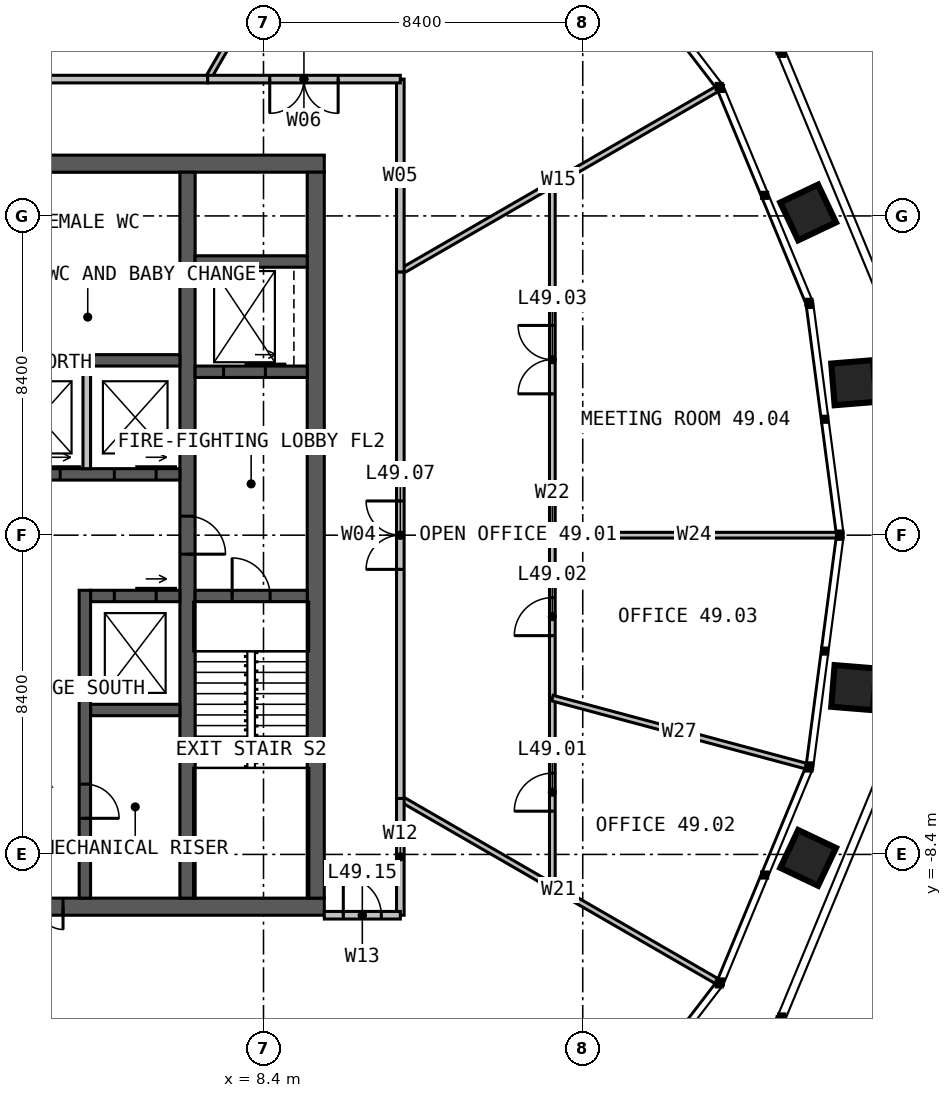
"""IFC4 building model, lengths in metres.
Left out: names, types, materials, properties, quantities, classifications, styles, units other than length and angle.
Written with IfcOpenShell. Run it as: python <this file> out.ifc"""

import sys

from ifc_helpers import new_model, si_unit, direction, frame, frame_2d, origin, place, context, subcontext, project, spatial, rectangle, extrude, element, fill, save


model = new_model("IFC4")
c1 = context("Model", 3, precision=1e-05, world=origin(), true_north=direction((0.0, 1.0)))
c2 = subcontext(c1, "Body", "Model", "MODEL_VIEW")
j1 = project(units=[si_unit("LENGTHUNIT", "METRE"), si_unit("PLANEANGLEUNIT", "RADIAN")], contexts=[c1])
p1 = place(None, origin())
s1 = spatial("IfcSite", under=j1, at=p1, CompositionType="ELEMENT")
p2 = place(p1, origin())
s2 = spatial("IfcBuilding", under=s1, at=p2, CompositionType="ELEMENT")
p3 = place(p2, frame((0.0, 0.0, 203.0)))
s3 = spatial("IfcBuildingStorey", under=s2, at=p3, CompositionType="ELEMENT", Elevation=203.0)
p4 = place(p3, frame((-10.0, 9.775, 0.0), z_axis=(0.0, 0.0, 1.0), x_axis=(1.0, 0.0, 0.0)))
e1 = element("IfcWall", 1, at=p4, inside=s3, PredefinedType="SOLIDWALL", context=c2, shape_type="SweptSolid", body=[
    extrude(rectangle(XDim=20.0, YDim=0.45, at=frame_2d((10.0, 0.0))), origin(), (0.0, 0.0, 1.0), 4.0),
])
p5 = place(p4, frame((9.4, 0.0, 0.0)))
e2 = element("IfcOpeningElement", 2, at=p5, cuts=e1, PredefinedType="OPENING", context=c2, shape_type="SweptSolid", body=[
    extrude(rectangle(XDim=1.2, YDim=2.2, at=frame_2d((0.6, 1.1))), frame((0.0, 0.235, 0.0), z_axis=(0.0, -1.0, 0.0), x_axis=(1.0, 0.0, 0.0)), (0.0, 0.0, 1.0), 0.47),
])
p6 = place(p3, frame((10.0, -9.775, 0.0), z_axis=(0.0, 0.0, 1.0), x_axis=(-1.0, 0.0, 0.0)))
e3 = element("IfcWall", 3, at=p6, inside=s3, PredefinedType="SOLIDWALL", context=c2, shape_type="SweptSolid", body=[
    extrude(rectangle(XDim=20.0, YDim=0.45, at=frame_2d((10.0, 0.0))), origin(), (0.0, 0.0, 1.0), 4.0),
])
p7 = place(p6, frame((6.875, 0.0, 0.0)))
e4 = element("IfcOpeningElement", 4, at=p7, cuts=e3, PredefinedType="OPENING", context=c2, shape_type="SweptSolid", body=[
    extrude(rectangle(XDim=1.2, YDim=2.2, at=frame_2d((0.6, 1.1))), frame((0.0, 0.235, 0.0), z_axis=(0.0, -1.0, 0.0), x_axis=(1.0, 0.0, 0.0)), (0.0, 0.0, 1.0), 0.47),
])
p8 = place(p3, frame((9.775, -9.55, 0.0), z_axis=(0.0, 0.0, 1.0), x_axis=(0.0, 1.0, 0.0)))
e5 = element("IfcWall", 5, at=p8, inside=s3, PredefinedType="SOLIDWALL", context=c2, shape_type="SweptSolid", body=[
    extrude(rectangle(XDim=19.1, YDim=0.45, at=frame_2d((9.55, 0.0))), origin(), (0.0, 0.0, 1.0), 4.0),
])
p9 = place(p3, frame((6.4, 9.55, 0.0), z_axis=(0.0, 0.0, 1.0), x_axis=(0.0, -1.0, 0.0)))
e6 = element("IfcWall", 6, at=p9, inside=s3, PredefinedType="SOLIDWALL", context=c2, shape_type="SweptSolid", body=[
    extrude(rectangle(XDim=19.1, YDim=0.4, at=frame_2d((9.55, 0.0))), origin(), (0.0, 0.0, 1.0), 4.0),
])
p10 = place(p9, frame((9.05, 0.0, 0.0)))
e7 = element("IfcOpeningElement", 7, at=p10, cuts=e6, PredefinedType="OPENING", context=c2, shape_type="SweptSolid", body=[
    extrude(rectangle(XDim=1.0, YDim=2.2, at=frame_2d((0.5, 1.1))), frame((0.0, 0.21, 0.0), z_axis=(0.0, -1.0, 0.0), x_axis=(1.0, 0.0, 0.0)), (0.0, 0.0, 1.0), 0.42),
])
p11 = place(p3, frame((1.35, 1.6, 0.0), z_axis=(0.0, 0.0, 1.0), x_axis=(1.0, 0.0, 0.0)))
e8 = element("IfcWall", 8, at=p11, inside=s3, PredefinedType="SOLIDWALL", context=c2, shape_type="SweptSolid", body=[
    extrude(rectangle(XDim=4.85, YDim=0.3, at=frame_2d((2.425, 0.0))), origin(), (0.0, 0.0, 1.0), 4.0),
])
p12 = place(p11, frame((0.6, 0.0, 0.0)))
e9 = element("IfcOpeningElement", 9, at=p12, cuts=e8, PredefinedType="OPENING", context=c2, shape_type="SweptSolid", body=[
    extrude(rectangle(XDim=1.1, YDim=2.2, at=frame_2d((0.55, 1.1))), frame((0.0, 0.16, 0.0), z_axis=(0.0, -1.0, 0.0), x_axis=(1.0, 0.0, 0.0)), (0.0, 0.0, 1.0), 0.32),
])
p13 = place(p11, frame((3.125, 0.0, 0.0)))
e10 = element("IfcOpeningElement", 10, at=p13, cuts=e8, PredefinedType="OPENING", context=c2, shape_type="SweptSolid", body=[
    extrude(rectangle(XDim=1.1, YDim=2.2, at=frame_2d((0.55, 1.1))), frame((0.0, 0.16, 0.0), z_axis=(0.0, -1.0, 0.0), x_axis=(1.0, 0.0, 0.0)), (0.0, 0.0, 1.0), 0.32),
])
p14 = place(p3, frame((1.35, 4.6, 0.0), z_axis=(0.0, 0.0, 1.0), x_axis=(1.0, 0.0, 0.0)))
e11 = element("IfcWall", 11, at=p14, inside=s3, PredefinedType="SOLIDWALL", context=c2, shape_type="SweptSolid", body=[
    extrude(rectangle(XDim=4.85, YDim=0.3, at=frame_2d((2.425, 0.0))), origin(), (0.0, 0.0, 1.0), 4.0),
])
p15 = place(p3, frame((3.85, -1.6, 0.0), z_axis=(0.0, 0.0, 1.0), x_axis=(1.0, 0.0, 0.0)))
e12 = element("IfcWall", 12, at=p15, inside=s3, PredefinedType="SOLIDWALL", context=c2, shape_type="SweptSolid", body=[
    extrude(rectangle(XDim=2.35, YDim=0.3, at=frame_2d((1.175, 0.0))), origin(), (0.0, 0.0, 1.0), 4.0),
])
p16 = place(p15, frame((0.625, 0.0, 0.0)))
e13 = element("IfcOpeningElement", 13, at=p16, cuts=e12, PredefinedType="OPENING", context=c2, shape_type="SweptSolid", body=[
    extrude(rectangle(XDim=1.1, YDim=2.2, at=frame_2d((0.55, 1.1))), frame((0.0, 0.16, 0.0), z_axis=(0.0, -1.0, 0.0), x_axis=(1.0, 0.0, 0.0)), (0.0, 0.0, 1.0), 0.32),
])
p17 = place(p3, frame((3.85, -4.6, 0.0), z_axis=(0.0, 0.0, 1.0), x_axis=(1.0, 0.0, 0.0)))
e14 = element("IfcWall", 14, at=p17, inside=s3, PredefinedType="SOLIDWALL", context=c2, shape_type="SweptSolid", body=[
    extrude(rectangle(XDim=2.35, YDim=0.3, at=frame_2d((1.175, 0.0))), origin(), (0.0, 0.0, 1.0), 4.0),
])
p18 = place(p3, frame((3.7, -1.45, 0.0), z_axis=(0.0, 0.0, 1.0), x_axis=(0.0, -1.0, 0.0)))
e15 = element("IfcWall", 15, at=p18, inside=s3, PredefinedType="SOLIDWALL", context=c2, shape_type="SweptSolid", body=[
    extrude(rectangle(XDim=8.1, YDim=0.3, at=frame_2d((4.05, 0.0))), origin(), (0.0, 0.0, 1.0), 4.0),
])
p19 = place(p18, frame((5.1, 0.0, 0.0)))
e16 = element("IfcOpeningElement", 16, at=p19, cuts=e15, PredefinedType="OPENING", context=c2, shape_type="SweptSolid", body=[
    extrude(rectangle(XDim=0.9, YDim=2.2, at=frame_2d((0.45, 1.1))), frame((0.0, 0.16, 0.0), z_axis=(0.0, -1.0, 0.0), x_axis=(1.0, 0.0, 0.0)), (0.0, 0.0, 1.0), 0.32),
])
p20 = place(p3, frame((6.6, -1.6, 0.0), z_axis=(0.0, 0.0, 1.0), x_axis=(1.0, 0.0, 0.0)))
e17 = element("IfcWall", 17, at=p20, inside=s3, PredefinedType="SOLIDWALL", context=c2, shape_type="SweptSolid", body=[
    extrude(rectangle(XDim=2.95, YDim=0.3, at=frame_2d((1.475, 0.0))), origin(), (0.0, 0.0, 1.0), 4.0),
])
p21 = place(p20, frame((0.975, 0.0, 0.0)))
e18 = element("IfcOpeningElement", 18, at=p21, cuts=e17, PredefinedType="OPENING", context=c2, shape_type="SweptSolid", body=[
    extrude(rectangle(XDim=1.0, YDim=2.2, at=frame_2d((0.5, 1.1))), frame((0.0, 0.16, 0.0), z_axis=(0.0, -1.0, 0.0), x_axis=(1.0, 0.0, 0.0)), (0.0, 0.0, 1.0), 0.32),
])
p22 = place(p3, frame((6.6, 4.3, 0.0), z_axis=(0.0, 0.0, 1.0), x_axis=(1.0, 0.0, 0.0)))
e19 = element("IfcWall", 19, at=p22, inside=s3, PredefinedType="SOLIDWALL", context=c2, shape_type="SweptSolid", body=[
    extrude(rectangle(XDim=2.95, YDim=0.3, at=frame_2d((1.475, 0.0))), origin(), (0.0, 0.0, 1.0), 4.0),
])
p23 = place(p22, frame((0.75, 0.0, 0.0)))
e20 = element("IfcOpeningElement", 20, at=p23, cuts=e19, PredefinedType="OPENING", context=c2, shape_type="SweptSolid", body=[
    extrude(rectangle(XDim=1.1, YDim=2.2, at=frame_2d((0.55, 1.1))), frame((0.0, 0.16, 0.0), z_axis=(0.0, -1.0, 0.0), x_axis=(1.0, 0.0, 0.0)), (0.0, 0.0, 1.0), 0.32),
])
p24 = place(p3, frame((6.6, 7.2, 0.0), z_axis=(0.0, 0.0, 1.0), x_axis=(1.0, 0.0, 0.0)))
e21 = element("IfcWall", 21, at=p24, inside=s3, PredefinedType="SOLIDWALL", context=c2, shape_type="SweptSolid", body=[
    extrude(rectangle(XDim=2.95, YDim=0.3, at=frame_2d((1.475, 0.0))), origin(), (0.0, 0.0, 1.0), 4.0),
])
p25 = place(p3, frame((3.75, 1.75, 0.0), z_axis=(0.0, 0.0, 1.0), x_axis=(0.0, 1.0, 0.0)))
e22 = element("IfcWall", 22, at=p25, inside=s3, PredefinedType="SOLIDWALL", context=c2, shape_type="SweptSolid", body=[
    extrude(rectangle(XDim=2.7, YDim=0.2, at=frame_2d((1.35, 0.0))), origin(), (0.0, 0.0, 1.0), 3.75),
])
p26 = place(p3, frame((1.35, 6.8, 0.0), z_axis=(0.0, 0.0, 1.0), x_axis=(1.0, 0.0, 0.0)))
e23 = element("IfcWall", 23, at=p26, inside=s3, PredefinedType="PARTITIONING", context=c2, shape_type="SweptSolid", body=[
    extrude(rectangle(XDim=4.85, YDim=0.15, at=frame_2d((2.425, 0.0))), origin(), (0.0, 0.0, 1.0), 3.75),
])
for number, where, z_axis, x_axis in (
    (24, (12.0, -6.928, 0.0), (0.0, 0.0, 1.0), (0.866, -0.5, 0.0)),
    (25, (12.0, 6.928, 0.0), (0.0, 0.0, 1.0), (0.866, 0.5, 0.0)),
    (26, (6.928, 12.0, 0.0), (0.0, 0.0, 1.0), (0.5, 0.866, 0.0)),
):
    element("IfcWall", number, at=place(p3, frame(where, z_axis=z_axis, x_axis=x_axis)), inside=s3, PredefinedType="PARTITIONING", context=c2, shape_type="SweptSolid", body=[
        extrude(rectangle(XDim=9.62, YDim=0.15, at=frame_2d((4.81, 0.0))), origin(), (0.0, 0.0, 1.0), 2.79),
    ])
p27 = place(p3, frame((16.0, -9.238, 0.0), z_axis=(0.0, 0.0, 1.0), x_axis=(0.0, 1.0, 0.0)))
e27 = element("IfcWall", 27, at=p27, inside=s3, PredefinedType="PARTITIONING", context=c2, shape_type="SweptSolid", body=[
    extrude(rectangle(XDim=18.475, YDim=0.15, at=frame_2d((9.238, 0.0))), origin(), (0.0, 0.0, 1.0), 2.79),
])
p28 = place(p27, frame((1.975, 0.0, 0.0)))
e28 = element("IfcOpeningElement", 28, at=p28, cuts=e27, PredefinedType="OPENING", context=c2, shape_type="SweptSolid", body=[
    extrude(rectangle(XDim=1.0, YDim=2.2, at=frame_2d((0.5, 1.1))), frame((0.0, 0.085, 0.0), z_axis=(0.0, -1.0, 0.0), x_axis=(1.0, 0.0, 0.0)), (0.0, 0.0, 1.0), 0.17),
])
p29 = place(p27, frame((6.594, 0.0, 0.0)))
e29 = element("IfcOpeningElement", 29, at=p29, cuts=e27, PredefinedType="OPENING", context=c2, shape_type="SweptSolid", body=[
    extrude(rectangle(XDim=1.0, YDim=2.2, at=frame_2d((0.5, 1.1))), frame((0.0, 0.085, 0.0), z_axis=(0.0, -1.0, 0.0), x_axis=(1.0, 0.0, 0.0)), (0.0, 0.0, 1.0), 0.17),
])
p30 = place(p27, frame((12.956, 0.0, 0.0)))
e30 = element("IfcOpeningElement", 30, at=p30, cuts=e27, PredefinedType="OPENING", context=c2, shape_type="SweptSolid", body=[
    extrude(rectangle(XDim=1.8, YDim=2.2, at=frame_2d((0.9, 1.1))), frame((0.0, 0.085, 0.0), z_axis=(0.0, -1.0, 0.0), x_axis=(1.0, 0.0, 0.0)), (0.0, 0.0, 1.0), 0.17),
])
p31 = place(p3, frame((16.0, -4.287, 0.0), z_axis=(0.0, 0.0, 1.0), x_axis=(0.965919985666, -0.258840841621, 0.0)))
e31 = element("IfcWall", 31, at=p31, inside=s3, PredefinedType="PARTITIONING", context=c2, shape_type="SweptSolid", body=[
    extrude(rectangle(XDim=6.912, YDim=0.15, at=frame_2d((3.456, 0.0))), origin(), (0.0, 0.0, 1.0), 2.79),
])
p32 = place(p3, frame((16.0, 0.0, 0.0), z_axis=(0.0, 0.0, 1.0), x_axis=(1.0, 0.0, 0.0)))
e32 = element("IfcWall", 32, at=p32, inside=s3, PredefinedType="PARTITIONING", context=c2, shape_type="SweptSolid", body=[
    extrude(rectangle(XDim=7.476, YDim=0.15, at=frame_2d((3.738, 0.0))), origin(), (0.0, 0.0, 1.0), 2.79),
])
p33 = place(p3, frame((12.0, -6.928, 0.0), z_axis=(0.0, 0.0, 1.0), x_axis=(0.0, 1.0, 0.0)))
e33 = element("IfcWall", 33, at=p33, inside=s3, PredefinedType="PARTITIONING", context=c2, shape_type="SweptSolid", body=[
    extrude(rectangle(XDim=13.856, YDim=0.2, at=frame_2d((6.928, 0.0))), origin(), (0.0, 0.0, 1.0), 3.8),
])
p34 = place(p33, frame((6.028, 0.0, 0.0)))
e34 = element("IfcOpeningElement", 34, at=p34, cuts=e33, PredefinedType="OPENING", context=c2, shape_type="SweptSolid", body=[
    extrude(rectangle(XDim=1.8, YDim=2.2, at=frame_2d((0.9, 1.1))), frame((0.0, 0.11, 0.0), z_axis=(0.0, -1.0, 0.0), x_axis=(1.0, 0.0, 0.0)), (0.0, 0.0, 1.0), 0.22),
])
p35 = place(p3, frame((12.0, 6.928, 0.0), z_axis=(0.0, 0.0, 1.0), x_axis=(0.0, 1.0, 0.0)))
e35 = element("IfcWall", 35, at=p35, inside=s3, PredefinedType="PARTITIONING", context=c2, shape_type="SweptSolid", body=[
    extrude(rectangle(XDim=5.072, YDim=0.2, at=frame_2d((2.536, 0.0))), origin(), (0.0, 0.0, 1.0), 3.8),
])
p36 = place(p3, frame((12.0, 12.0, 0.0), z_axis=(0.0, 0.0, 1.0), x_axis=(-1.0, 0.0, 0.0)))
e36 = element("IfcWall", 36, at=p36, inside=s3, PredefinedType="PARTITIONING", context=c2, shape_type="SweptSolid", body=[
    extrude(rectangle(XDim=5.072, YDim=0.2, at=frame_2d((2.536, 0.0))), origin(), (0.0, 0.0, 1.0), 3.8),
])
p37 = place(p36, frame((1.636, 0.0, 0.0)))
e37 = element("IfcOpeningElement", 37, at=p37, cuts=e36, PredefinedType="OPENING", context=c2, shape_type="SweptSolid", body=[
    extrude(rectangle(XDim=1.8, YDim=2.2, at=frame_2d((0.9, 1.1))), frame((0.0, 0.11, 0.0), z_axis=(0.0, -1.0, 0.0), x_axis=(1.0, 0.0, 0.0)), (0.0, 0.0, 1.0), 0.22),
])
p38 = place(p3, frame((6.928, 12.0, 0.0), z_axis=(0.0, 0.0, 1.0), x_axis=(-1.0, 0.0, 0.0)))
e38 = element("IfcWall", 38, at=p38, inside=s3, PredefinedType="PARTITIONING", context=c2, shape_type="SweptSolid", body=[
    extrude(rectangle(XDim=13.856, YDim=0.2, at=frame_2d((6.928, 0.0))), origin(), (0.0, 0.0, 1.0), 3.8),
])
p39 = place(p38, frame((6.028, 0.0, 0.0)))
e39 = element("IfcOpeningElement", 39, at=p39, cuts=e38, PredefinedType="OPENING", context=c2, shape_type="SweptSolid", body=[
    extrude(rectangle(XDim=1.8, YDim=2.2, at=frame_2d((0.9, 1.1))), frame((0.0, 0.11, 0.0), z_axis=(0.0, -1.0, 0.0), x_axis=(1.0, 0.0, 0.0)), (0.0, 0.0, 1.0), 0.22),
])
p40 = place(p3, frame((12.0, -10.0, 0.0), z_axis=(0.0, 0.0, 1.0), x_axis=(0.0, 1.0, 0.0)))
e40 = element("IfcWall", 40, at=p40, inside=s3, PredefinedType="PARTITIONING", context=c2, shape_type="SweptSolid", body=[
    extrude(rectangle(XDim=3.072, YDim=0.2, at=frame_2d((1.536, 0.0))), origin(), (0.0, 0.0, 1.0), 3.8),
])
p41 = place(p3, frame((10.0, -10.0, 0.0), z_axis=(0.0, 0.0, 1.0), x_axis=(1.0, 0.0, 0.0)))
e41 = element("IfcWall", 41, at=p41, inside=s3, PredefinedType="PARTITIONING", context=c2, shape_type="SweptSolid", body=[
    extrude(rectangle(XDim=2.0, YDim=0.2, at=frame_2d((1.0, 0.0))), origin(), (0.0, 0.0, 1.0), 3.8),
])
p42 = place(p41, frame((0.5, 0.0, 0.0)))
e42 = element("IfcOpeningElement", 42, at=p42, cuts=e41, PredefinedType="OPENING", context=c2, shape_type="SweptSolid", body=[
    extrude(rectangle(XDim=1.0, YDim=2.2, at=frame_2d((0.5, 1.1))), frame((0.0, 0.11, 0.0), z_axis=(0.0, -1.0, 0.0), x_axis=(1.0, 0.0, 0.0)), (0.0, 0.0, 1.0), 0.22),
])
p43 = place(p7, origin())
e43 = element("IfcDoor", 43, at=p43, inside=s3, OperationType="DOUBLE_DOOR_SINGLE_SWING", PredefinedType="DOOR", context=c2, shape_type="SweptSolid", body=[
    extrude(rectangle(XDim=1.2, YDim=2.2, at=frame_2d((0.6, 1.1))), frame((0.0, 0.025, 0.0), z_axis=(0.0, -1.0, 0.0), x_axis=(1.0, 0.0, 0.0)), (0.0, 0.0, 1.0), 0.05),
])
fill(e4, e43)
p44 = place(p10, origin())
e44 = element("IfcDoor", 44, at=p44, inside=s3, OperationType="SINGLE_SWING_RIGHT", PredefinedType="DOOR", context=c2, shape_type="SweptSolid", body=[
    extrude(rectangle(XDim=1.0, YDim=2.2, at=frame_2d((0.5, 1.1))), frame((0.0, 0.025, 0.0), z_axis=(0.0, -1.0, 0.0), x_axis=(1.0, 0.0, 0.0)), (0.0, 0.0, 1.0), 0.05),
])
fill(e7, e44)
p45 = place(p21, origin())
e45 = element("IfcDoor", 45, at=p45, inside=s3, OperationType="SINGLE_SWING_LEFT", PredefinedType="DOOR", context=c2, shape_type="SweptSolid", body=[
    extrude(rectangle(XDim=1.0, YDim=2.2, at=frame_2d((0.5, 1.1))), frame((0.0, 0.025, 0.0), z_axis=(0.0, -1.0, 0.0), x_axis=(1.0, 0.0, 0.0)), (0.0, 0.0, 1.0), 0.05),
])
fill(e18, e45)
p46 = place(p19, origin())
e46 = element("IfcDoor", 46, at=p46, inside=s3, OperationType="SINGLE_SWING_RIGHT", PredefinedType="DOOR", context=c2, shape_type="SweptSolid", body=[
    extrude(rectangle(XDim=0.9, YDim=2.2, at=frame_2d((0.45, 1.1))), frame((0.0, 0.025, 0.0), z_axis=(0.0, -1.0, 0.0), x_axis=(1.0, 0.0, 0.0)), (0.0, 0.0, 1.0), 0.05),
])
fill(e16, e46)
p47 = place(p12, origin())
e47 = element("IfcDoor", 47, at=p47, inside=s3, OperationType="SLIDING_TO_LEFT", PredefinedType="DOOR", context=c2, shape_type="SweptSolid", body=[
    extrude(rectangle(XDim=1.1, YDim=2.2, at=frame_2d((0.55, 1.1))), frame((0.0, 0.025, 0.0), z_axis=(0.0, -1.0, 0.0), x_axis=(1.0, 0.0, 0.0)), (0.0, 0.0, 1.0), 0.05),
])
fill(e9, e47)
p48 = place(p13, origin())
e48 = element("IfcDoor", 48, at=p48, inside=s3, OperationType="SLIDING_TO_LEFT", PredefinedType="DOOR", context=c2, shape_type="SweptSolid", body=[
    extrude(rectangle(XDim=1.1, YDim=2.2, at=frame_2d((0.55, 1.1))), frame((0.0, 0.025, 0.0), z_axis=(0.0, -1.0, 0.0), x_axis=(1.0, 0.0, 0.0)), (0.0, 0.0, 1.0), 0.05),
])
fill(e10, e48)
p49 = place(p16, origin())
e49 = element("IfcDoor", 49, at=p49, inside=s3, OperationType="SLIDING_TO_LEFT", PredefinedType="DOOR", context=c2, shape_type="SweptSolid", body=[
    extrude(rectangle(XDim=1.1, YDim=2.2, at=frame_2d((0.55, 1.1))), frame((0.0, 0.025, 0.0), z_axis=(0.0, -1.0, 0.0), x_axis=(1.0, 0.0, 0.0)), (0.0, 0.0, 1.0), 0.05),
])
fill(e13, e49)
p50 = place(p23, origin())
e50 = element("IfcDoor", 50, at=p50, inside=s3, OperationType="SLIDING_TO_LEFT", PredefinedType="DOOR", context=c2, shape_type="SweptSolid", body=[
    extrude(rectangle(XDim=1.1, YDim=2.2, at=frame_2d((0.55, 1.1))), frame((0.0, 0.025, 0.0), z_axis=(0.0, -1.0, 0.0), x_axis=(1.0, 0.0, 0.0)), (0.0, 0.0, 1.0), 0.05),
])
fill(e20, e50)
p51 = place(p28, origin())
e51 = element("IfcDoor", 51, at=p51, inside=s3, OperationType="SINGLE_SWING_LEFT", PredefinedType="DOOR", context=c2, shape_type="SweptSolid", body=[
    extrude(rectangle(XDim=1.0, YDim=2.2, at=frame_2d((0.5, 1.1))), frame((0.0, 0.025, 0.0), z_axis=(0.0, -1.0, 0.0), x_axis=(1.0, 0.0, 0.0)), (0.0, 0.0, 1.0), 0.05),
])
fill(e28, e51)
p52 = place(p29, origin())
e52 = element("IfcDoor", 52, at=p52, inside=s3, OperationType="SINGLE_SWING_LEFT", PredefinedType="DOOR", context=c2, shape_type="SweptSolid", body=[
    extrude(rectangle(XDim=1.0, YDim=2.2, at=frame_2d((0.5, 1.1))), frame((0.0, 0.025, 0.0), z_axis=(0.0, -1.0, 0.0), x_axis=(1.0, 0.0, 0.0)), (0.0, 0.0, 1.0), 0.05),
])
fill(e29, e52)
p53 = place(p30, origin())
e53 = element("IfcDoor", 53, at=p53, inside=s3, OperationType="DOUBLE_DOOR_SINGLE_SWING", PredefinedType="DOOR", context=c2, shape_type="SweptSolid", body=[
    extrude(rectangle(XDim=1.8, YDim=2.2, at=frame_2d((0.9, 1.1))), frame((0.0, 0.025, 0.0), z_axis=(0.0, -1.0, 0.0), x_axis=(1.0, 0.0, 0.0)), (0.0, 0.0, 1.0), 0.05),
])
fill(e30, e53)
p54 = place(p34, origin())
e54 = element("IfcDoor", 54, at=p54, inside=s3, OperationType="DOUBLE_DOOR_SINGLE_SWING", PredefinedType="DOOR", context=c2, shape_type="SweptSolid", body=[
    extrude(rectangle(XDim=1.8, YDim=2.2, at=frame_2d((0.9, 1.1))), frame((0.0, 0.025, 0.0), z_axis=(0.0, -1.0, 0.0), x_axis=(1.0, 0.0, 0.0)), (0.0, 0.0, 1.0), 0.05),
])
fill(e34, e54)
p55 = place(p37, origin())
e55 = element("IfcDoor", 55, at=p55, inside=s3, OperationType="DOUBLE_DOOR_SINGLE_SWING", PredefinedType="DOOR", context=c2, shape_type="SweptSolid", body=[
    extrude(rectangle(XDim=1.8, YDim=2.2, at=frame_2d((0.9, 1.1))), frame((0.0, 0.025, 0.0), z_axis=(0.0, -1.0, 0.0), x_axis=(1.0, 0.0, 0.0)), (0.0, 0.0, 1.0), 0.05),
])
fill(e37, e55)
p56 = place(p42, origin())
e56 = element("IfcDoor", 56, at=p56, inside=s3, OperationType="SINGLE_SWING_LEFT", PredefinedType="DOOR", context=c2, shape_type="SweptSolid", body=[
    extrude(rectangle(XDim=1.0, YDim=2.2, at=frame_2d((0.5, 1.1))), frame((0.0, 0.025, 0.0), z_axis=(0.0, -1.0, 0.0), x_axis=(1.0, 0.0, 0.0)), (0.0, 0.0, 1.0), 0.05),
])
fill(e42, e56)
save(model, sys.argv[1])
